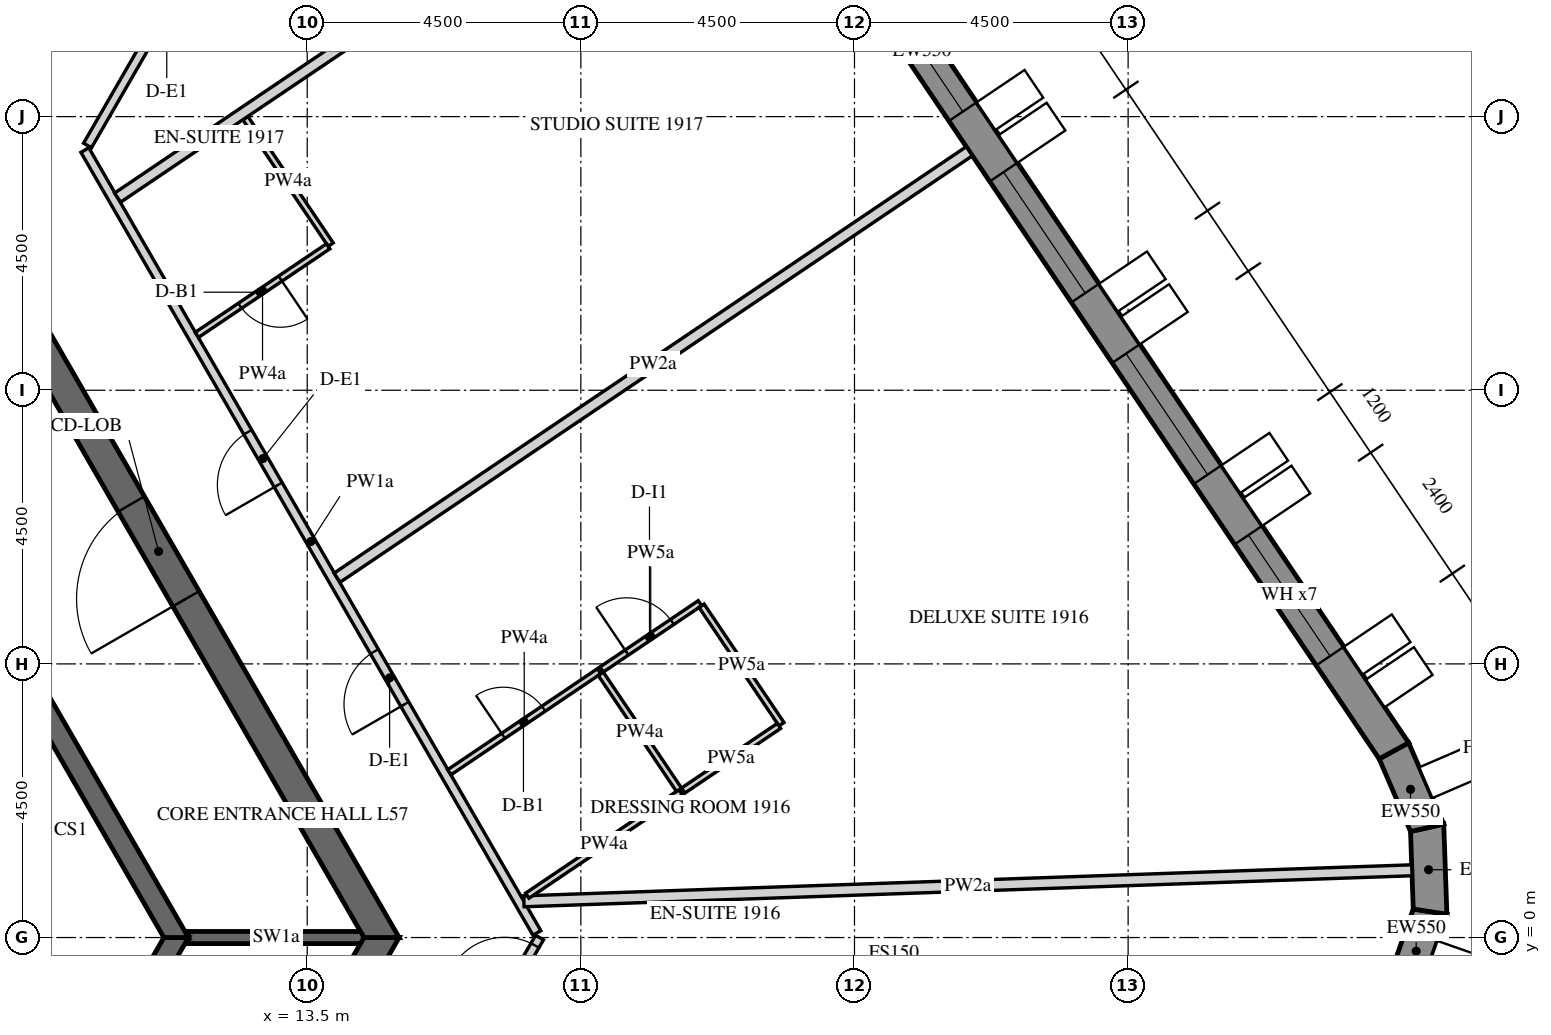
"""IFC4 building model, lengths in metres.
Left out: names, types, materials, properties, quantities, classifications, styles, units other than length and angle.
Written with IfcOpenShell. Run it as: python <this file> out.ifc"""

import sys

from ifc_helpers import new_model, si_unit, direction, frame, frame_2d, origin, place, context, subcontext, project, spatial, polyline, rectangle, outline, extrude, element, fill, save


model = new_model("IFC4")
c1 = context("Model", 3, precision=1e-05, world=origin(), true_north=direction((0.0, 1.0)))
c2 = subcontext(c1, "Body", "Model", "MODEL_VIEW")
j1 = project(units=[si_unit("LENGTHUNIT", "METRE"), si_unit("PLANEANGLEUNIT", "RADIAN")], contexts=[c1])
p1 = place(None, origin())
s1 = spatial("IfcSite", under=j1, at=p1, CompositionType="ELEMENT")
p2 = place(p1, origin())
s2 = spatial("IfcBuilding", under=s1, at=p2, CompositionType="ELEMENT")
p3 = place(p2, frame((0.0, 0.0, 238.5)))
s3 = spatial("IfcBuildingStorey", under=s2, at=p3, CompositionType="ELEMENT", Elevation=238.5)
p4 = place(p3, frame((31.509, -0.875, -0.15), z_axis=(0.0, 0.0, 1.0), x_axis=(0.33111537203, 0.943590276765, 0.0)))
e1 = element("IfcWall", 1, at=p4, inside=s3, PredefinedType="SOLIDWALL", context=c2, shape_type="SweptSolid", body=[
    extrude(outline(polyline([(-0.026, -0.275), (1.431, -0.275), (1.327, 0.275), (0.026, 0.275), (-0.026, -0.275)])), origin(), (0.0, 0.0, 1.0), 3.9),
])
p5 = place(p3, frame((31.966, 0.426, -0.15), z_axis=(0.0, 0.0, 1.0), x_axis=(-0.034876908462, 0.999391615562, 0.0)))
e2 = element("IfcWall", 2, at=p5, inside=s3, PredefinedType="SOLIDWALL", context=c2, shape_type="SweptSolid", body=[
    extrude(outline(polyline([(-0.052, -0.275), (1.431, -0.275), (1.327, 0.275), (0.052, 0.275), (-0.052, -0.275)])), origin(), (0.0, 0.0, 1.0), 3.9),
])
p6 = place(p3, frame((31.917, 1.804, -0.15), z_axis=(0.0, 0.0, 1.0), x_axis=(-0.396225741392, 0.918153125496, 0.0)))
e3 = element("IfcWall", 3, at=p6, inside=s3, PredefinedType="SOLIDWALL", context=c2, shape_type="SweptSolid", body=[
    extrude(outline(polyline([(-0.052, -0.275), (1.405, -0.275), (1.353, 0.275), (0.052, 0.275), (-0.052, -0.275)])), origin(), (0.0, 0.0, 1.0), 3.9),
])
p7 = place(p3, frame((31.371, 3.071, -0.15), z_axis=(0.0, 0.0, 1.0), x_axis=(-0.559189891278, 0.829039604297, 0.0)))
e4 = element("IfcWall", 4, at=p7, inside=s3, PredefinedType="SOLIDWALL", context=c2, shape_type="SweptSolid", body=[
    extrude(outline(polyline([(-0.026, -0.275), (27.781, -0.275), (27.736, 0.275), (0.026, 0.275), (-0.026, -0.275)])), origin(), (0.0, 0.0, 1.0), 3.9),
])
p8 = place(p7, frame((1.879, 0.0, 1.05)))
e5 = element("IfcOpeningElement", 5, at=p8, cuts=e4, PredefinedType="OPENING", context=c2, shape_type="SweptSolid", body=[
    extrude(rectangle(XDim=2.4, YDim=2.4, at=frame_2d((1.2, 1.2))), frame((0.0, 0.285, 0.0), z_axis=(0.0, -1.0, 0.0), x_axis=(1.0, 0.0, 0.0)), (0.0, 0.0, 1.0), 0.57),
])
p9 = place(p7, frame((5.479, 0.0, 1.05)))
e6 = element("IfcOpeningElement", 6, at=p9, cuts=e4, PredefinedType="OPENING", context=c2, shape_type="SweptSolid", body=[
    extrude(rectangle(XDim=2.4, YDim=2.4, at=frame_2d((1.2, 1.2))), frame((0.0, 0.285, 0.0), z_axis=(0.0, -1.0, 0.0), x_axis=(1.0, 0.0, 0.0)), (0.0, 0.0, 1.0), 0.57),
])
p10 = place(p7, frame((9.079, 0.0, 1.05)))
e7 = element("IfcOpeningElement", 7, at=p10, cuts=e4, PredefinedType="OPENING", context=c2, shape_type="SweptSolid", body=[
    extrude(rectangle(XDim=2.4, YDim=2.4, at=frame_2d((1.2, 1.2))), frame((0.0, 0.285, 0.0), z_axis=(0.0, -1.0, 0.0), x_axis=(1.0, 0.0, 0.0)), (0.0, 0.0, 1.0), 0.57),
])
p11 = place(p7, frame((12.679, 0.0, 1.05)))
e8 = element("IfcOpeningElement", 8, at=p11, cuts=e4, PredefinedType="OPENING", context=c2, shape_type="SweptSolid", body=[
    extrude(rectangle(XDim=2.4, YDim=2.4, at=frame_2d((1.2, 1.2))), frame((0.0, 0.285, 0.0), z_axis=(0.0, -1.0, 0.0), x_axis=(1.0, 0.0, 0.0)), (0.0, 0.0, 1.0), 0.57),
])
p12 = place(p7, frame((16.279, 0.0, 1.05)))
e9 = element("IfcOpeningElement", 9, at=p12, cuts=e4, PredefinedType="OPENING", context=c2, shape_type="SweptSolid", body=[
    extrude(rectangle(XDim=2.4, YDim=2.4, at=frame_2d((1.2, 1.2))), frame((0.0, 0.285, 0.0), z_axis=(0.0, -1.0, 0.0), x_axis=(1.0, 0.0, 0.0)), (0.0, 0.0, 1.0), 0.57),
])
p13 = place(p7, frame((19.879, 0.0, 1.05)))
e10 = element("IfcOpeningElement", 10, at=p13, cuts=e4, PredefinedType="OPENING", context=c2, shape_type="SweptSolid", body=[
    extrude(rectangle(XDim=2.4, YDim=2.4, at=frame_2d((1.2, 1.2))), frame((0.0, 0.285, 0.0), z_axis=(0.0, -1.0, 0.0), x_axis=(1.0, 0.0, 0.0)), (0.0, 0.0, 1.0), 0.57),
])
p14 = place(p7, frame((23.479, 0.0, 1.05)))
e11 = element("IfcOpeningElement", 11, at=p14, cuts=e4, PredefinedType="OPENING", context=c2, shape_type="SweptSolid", body=[
    extrude(rectangle(XDim=2.4, YDim=2.4, at=frame_2d((1.2, 1.2))), frame((0.0, 0.285, 0.0), z_axis=(0.0, -1.0, 0.0), x_axis=(1.0, 0.0, 0.0)), (0.0, 0.0, 1.0), 0.57),
])
p15 = place(p3, frame((7.361, -12.75, -0.15), z_axis=(0.0, 0.0, 1.0), x_axis=(0.50000571537, 0.866022103989, 0.0)))
e12 = element("IfcWall", 12, at=p15, inside=s3, PredefinedType="SHEAR", context=c2, shape_type="SweptSolid", body=[
    extrude(outline(polyline([(-0.144, -0.25), (14.867, -0.25), (14.578, 0.25), (0.144, 0.25), (-0.144, -0.25)])), origin(), (0.0, 0.0, 1.0), 3.9),
])
p16 = place(p15, frame((6.49, 0.0, 0.15)))
e13 = element("IfcOpeningElement", 13, at=p16, cuts=e12, PredefinedType="OPENING", context=c2, shape_type="SweptSolid", body=[
    extrude(rectangle(XDim=1.8, YDim=2.4, at=frame_2d((0.9, 1.2))), frame((0.0, 0.26, 0.0), z_axis=(0.0, -1.0, 0.0), x_axis=(1.0, 0.0, 0.0)), (0.0, 0.0, 1.0), 0.52),
])
p17 = place(p3, frame((14.722, 0.0, -0.15), z_axis=(0.0, 0.0, 1.0), x_axis=(-0.50000571537, 0.866022103989, 0.0)))
e14 = element("IfcWall", 14, at=p17, inside=s3, PredefinedType="SHEAR", context=c2, shape_type="SweptSolid", body=[
    extrude(outline(polyline([(-0.144, -0.25), (14.867, -0.25), (14.578, 0.25), (0.144, 0.25), (-0.144, -0.25)])), origin(), (0.0, 0.0, 1.0), 3.9),
])
p18 = place(p17, frame((6.432, 0.0, 0.15)))
e15 = element("IfcOpeningElement", 15, at=p18, cuts=e14, PredefinedType="OPENING", context=c2, shape_type="SweptSolid", body=[
    extrude(rectangle(XDim=1.8, YDim=2.4, at=frame_2d((0.9, 1.2))), frame((0.0, 0.26, 0.0), z_axis=(0.0, -1.0, 0.0), x_axis=(1.0, 0.0, 0.0)), (0.0, 0.0, 1.0), 0.52),
])
p19 = place(p3, frame((7.506, 13.0, -0.15), z_axis=(0.0, 0.0, 1.0), x_axis=(0.499988271576, 0.866032175087, 0.0)))
e16 = element("IfcWall", 16, at=p19, inside=s3, PredefinedType="SHEAR", context=c2, shape_type="SweptSolid", body=[
    extrude(rectangle(XDim=15.424, YDim=0.5, at=frame_2d((7.712, 0.0))), origin(), (0.0, 0.0, 1.0), 3.9),
])
p20 = place(p19, frame((6.812, 0.0, 0.15)))
e17 = element("IfcOpeningElement", 17, at=p20, cuts=e16, PredefinedType="OPENING", context=c2, shape_type="SweptSolid", body=[
    extrude(rectangle(XDim=1.8, YDim=2.4, at=frame_2d((0.9, 1.2))), frame((0.0, 0.26, 0.0), z_axis=(0.0, -1.0, 0.0), x_axis=(1.0, 0.0, 0.0)), (0.0, 0.0, 1.0), 0.52),
])
p21 = place(p3, frame((5.673, -9.825, -0.15), z_axis=(0.0, 0.0, 1.0), x_axis=(0.499995046907, 0.866028263435, 0.0)))
e18 = element("IfcWall", 18, at=p21, inside=s3, PredefinedType="SHEAR", context=c2, shape_type="SweptSolid", body=[
    extrude(outline(polyline([(-0.101, -0.175), (11.446, -0.175), (11.244, 0.175), (0.101, 0.175), (-0.101, -0.175)])), origin(), (0.0, 0.0, 1.0), 3.9),
])
p22 = place(p21, frame((4.801, 0.0, 0.15)))
e19 = element("IfcOpeningElement", 19, at=p22, cuts=e18, PredefinedType="OPENING", context=c2, shape_type="SweptSolid", body=[
    extrude(rectangle(XDim=1.8, YDim=2.4, at=frame_2d((0.9, 1.2))), frame((0.0, 0.185, 0.0), z_axis=(0.0, -1.0, 0.0), x_axis=(1.0, 0.0, 0.0)), (0.0, 0.0, 1.0), 0.37),
])
p23 = place(p3, frame((11.345, 0.0, -0.15), z_axis=(0.0, 0.0, 1.0), x_axis=(-0.499995046907, 0.866028263435, 0.0)))
e20 = element("IfcWall", 20, at=p23, inside=s3, PredefinedType="SHEAR", context=c2, shape_type="SweptSolid", body=[
    extrude(outline(polyline([(-0.101, -0.175), (11.446, -0.175), (11.244, 0.175), (0.101, 0.175), (-0.101, -0.175)])), origin(), (0.0, 0.0, 1.0), 3.9),
])
p24 = place(p23, frame((4.744, 0.0, 0.15)))
e21 = element("IfcOpeningElement", 21, at=p24, cuts=e20, PredefinedType="OPENING", context=c2, shape_type="SweptSolid", body=[
    extrude(rectangle(XDim=1.8, YDim=2.4, at=frame_2d((0.9, 1.2))), frame((0.0, 0.185, 0.0), z_axis=(0.0, -1.0, 0.0), x_axis=(1.0, 0.0, 0.0)), (0.0, 0.0, 1.0), 0.37),
])
p25 = place(p3, frame((11.547, 0.0, -0.15), z_axis=(0.0, 0.0, 1.0), x_axis=(1.0, 0.0, 0.0)))
e22 = element("IfcWall", 22, at=p25, inside=s3, PredefinedType="SHEAR", context=c2, shape_type="SweptSolid", body=[
    extrude(rectangle(XDim=2.887, YDim=0.2, at=frame_2d((1.443, 0.0))), origin(), (0.0, 0.0, 1.0), 3.9),
])
p26 = place(p3, frame((9.887, -12.875, 0.0), z_axis=(0.0, 0.0, 1.0), x_axis=(0.499998228944, 0.866026426302, 0.0)))
e23 = element("IfcWall", 23, at=p26, inside=s3, PredefinedType="PARTITIONING", context=c2, shape_type="SweptSolid", body=[
    extrude(rectangle(XDim=14.867, YDim=0.15, at=frame_2d((7.433, 0.0))), origin(), (0.0, 0.0, 1.0), 2.838),
])
p27 = place(p26, frame((3.519, 0.0, 0.0)))
e24 = element("IfcOpeningElement", 24, at=p27, cuts=e23, PredefinedType="OPENING", context=c2, shape_type="SweptSolid", body=[
    extrude(rectangle(XDim=1.0, YDim=2.1, at=frame_2d((0.5, 1.05))), frame((0.0, 0.085, 0.0), z_axis=(0.0, -1.0, 0.0), x_axis=(1.0, 0.0, 0.0)), (0.0, 0.0, 1.0), 0.17),
])
p28 = place(p26, frame((7.324, 0.0, 0.0)))
e25 = element("IfcOpeningElement", 25, at=p28, cuts=e23, PredefinedType="OPENING", context=c2, shape_type="SweptSolid", body=[
    extrude(rectangle(XDim=1.0, YDim=2.1, at=frame_2d((0.5, 1.05))), frame((0.0, 0.085, 0.0), z_axis=(0.0, -1.0, 0.0), x_axis=(1.0, 0.0, 0.0)), (0.0, 0.0, 1.0), 0.17),
])
p29 = place(p26, frame((13.717, 0.0, 0.0)))
e26 = element("IfcOpeningElement", 26, at=p29, cuts=e23, PredefinedType="OPENING", context=c2, shape_type="SweptSolid", body=[
    extrude(rectangle(XDim=1.0, YDim=2.1, at=frame_2d((0.5, 1.05))), frame((0.0, 0.085, 0.0), z_axis=(0.0, -1.0, 0.0), x_axis=(1.0, 0.0, 0.0)), (0.0, 0.0, 1.0), 0.17),
])
p30 = place(p3, frame((17.277, 0.075, 0.0), z_axis=(0.0, 0.0, 1.0), x_axis=(-0.499998228944, 0.866026426302, 0.0)))
e27 = element("IfcWall", 27, at=p30, inside=s3, PredefinedType="PARTITIONING", context=c2, shape_type="SweptSolid", body=[
    extrude(rectangle(XDim=14.867, YDim=0.15, at=frame_2d((7.433, 0.0))), origin(), (0.0, 0.0, 1.0), 2.838),
])
p31 = place(p30, frame((4.345, 0.0, 0.0)))
e28 = element("IfcOpeningElement", 28, at=p31, cuts=e27, PredefinedType="OPENING", context=c2, shape_type="SweptSolid", body=[
    extrude(rectangle(XDim=1.0, YDim=2.1, at=frame_2d((0.5, 1.05))), frame((0.0, 0.085, 0.0), z_axis=(0.0, -1.0, 0.0), x_axis=(1.0, 0.0, 0.0)), (0.0, 0.0, 1.0), 0.17),
])
p32 = place(p30, frame((8.51, 0.0, 0.0)))
e29 = element("IfcOpeningElement", 29, at=p32, cuts=e27, PredefinedType="OPENING", context=c2, shape_type="SweptSolid", body=[
    extrude(rectangle(XDim=1.0, YDim=2.1, at=frame_2d((0.5, 1.05))), frame((0.0, 0.085, 0.0), z_axis=(0.0, -1.0, 0.0), x_axis=(1.0, 0.0, 0.0)), (0.0, 0.0, 1.0), 0.17),
])
p33 = place(p3, frame((9.887, 13.025, 0.0), z_axis=(0.0, 0.0, 1.0), x_axis=(0.499985955615, 0.866033512162, 0.0)))
e30 = element("IfcWall", 30, at=p33, inside=s3, PredefinedType="PARTITIONING", context=c2, shape_type="SweptSolid", body=[
    extrude(rectangle(XDim=7.699, YDim=0.15, at=frame_2d((3.85, 0.0))), origin(), (0.0, 0.0, 1.0), 2.838),
])
p34 = place(p33, frame((2.106, 0.0, 0.0)))
e31 = element("IfcOpeningElement", 31, at=p34, cuts=e30, PredefinedType="OPENING", context=c2, shape_type="SweptSolid", body=[
    extrude(rectangle(XDim=1.0, YDim=2.1, at=frame_2d((0.5, 1.05))), frame((0.0, 0.085, 0.0), z_axis=(0.0, -1.0, 0.0), x_axis=(1.0, 0.0, 0.0)), (0.0, 0.0, 1.0), 0.17),
])
p35 = place(p3, frame((31.667, 1.106, 0.0), z_axis=(0.0, 0.0, 1.0), x_axis=(-0.999391305206, -0.034885800543, 0.0)))
e32 = element("IfcWall", 32, at=p35, inside=s3, PredefinedType="PARTITIONING", context=c2, shape_type="SweptSolid", body=[
    extrude(rectangle(XDim=14.612, YDim=0.18, at=frame_2d((7.306, 0.0))), origin(), (0.0, 0.0, 1.0), 2.838),
])
p36 = place(p3, frame((15.838, 2.719, 0.0), z_axis=(0.0, 0.0, 1.0), x_axis=(0.829027811096, 0.559207375156, 0.0)))
e33 = element("IfcWall", 33, at=p36, inside=s3, PredefinedType="PARTITIONING", context=c2, shape_type="SweptSolid", body=[
    extrude(rectangle(XDim=2.97, YDim=0.1, at=frame_2d((1.485, 0.0))), origin(), (0.0, 0.0, 1.0), 2.838),
])
p37 = place(p36, frame((1.07, 0.0, 0.0)))
e34 = element("IfcOpeningElement", 34, at=p37, cuts=e33, PredefinedType="OPENING", context=c2, shape_type="SweptSolid", body=[
    extrude(rectangle(XDim=0.8, YDim=2.1, at=frame_2d((0.4, 1.05))), frame((0.0, 0.06, 0.0), z_axis=(0.0, -1.0, 0.0), x_axis=(1.0, 0.0, 0.0)), (0.0, 0.0, 1.0), 0.12),
])
p38 = place(p3, frame((19.642, 2.389, 0.0), z_axis=(0.0, 0.0, 1.0), x_axis=(-0.82902628405, -0.559209639004, 0.0)))
e35 = element("IfcWall", 35, at=p38, inside=s3, PredefinedType="PARTITIONING", context=c2, shape_type="SweptSolid", body=[
    extrude(rectangle(XDim=3.043, YDim=0.1, at=frame_2d((1.521, 0.0))), origin(), (0.0, 0.0, 1.0), 2.838),
])
p39 = place(p3, frame((18.341, 4.407, 0.0), z_axis=(0.0, 0.0, 1.0), x_axis=(0.829014089772, 0.559227716552, 0.0)))
e36 = element("IfcWall", 36, at=p39, inside=s3, PredefinedType="PARTITIONING", context=c2, shape_type="SweptSolid", body=[
    extrude(rectangle(XDim=1.95, YDim=0.1, at=frame_2d((0.975, 0.0))), origin(), (0.0, 0.0, 1.0), 2.838),
])
p40 = place(p39, frame((0.5, 0.0, 0.0)))
e37 = element("IfcOpeningElement", 37, at=p40, cuts=e36, PredefinedType="OPENING", context=c2, shape_type="SweptSolid", body=[
    extrude(rectangle(XDim=0.9, YDim=2.1, at=frame_2d((0.45, 1.05))), frame((0.0, 0.06, 0.0), z_axis=(0.0, -1.0, 0.0), x_axis=(1.0, 0.0, 0.0)), (0.0, 0.0, 1.0), 0.12),
])
p41 = place(p3, frame((19.986, 5.456, 0.0), z_axis=(0.0, 0.0, 1.0), x_axis=(0.559223037199, -0.829017246302, 0.0)))
e38 = element("IfcWall", 38, at=p41, inside=s3, PredefinedType="PARTITIONING", context=c2, shape_type="SweptSolid", body=[
    extrude(rectangle(XDim=2.35, YDim=0.1, at=frame_2d((1.175, 0.0))), origin(), (0.0, 0.0, 1.0), 2.838),
])
p42 = place(p3, frame((21.258, 3.48, 0.0), z_axis=(0.0, 0.0, 1.0), x_axis=(-0.82903334026, -0.559199178055, 0.0)))
e39 = element("IfcWall", 39, at=p42, inside=s3, PredefinedType="PARTITIONING", context=c2, shape_type="SweptSolid", body=[
    extrude(rectangle(XDim=1.9, YDim=0.1, at=frame_2d((0.95, 0.0))), origin(), (0.0, 0.0, 1.0), 2.838),
])
p43 = place(p3, frame((24.389, 12.931, 0.0), z_axis=(0.0, 0.0, 1.0), x_axis=(-0.829040439793, -0.559188652593, 0.0)))
e40 = element("IfcWall", 40, at=p43, inside=s3, PredefinedType="PARTITIONING", context=c2, shape_type="SweptSolid", body=[
    extrude(rectangle(XDim=12.542, YDim=0.18, at=frame_2d((6.271, 0.0))), origin(), (0.0, 0.0, 1.0), 2.838),
])
p44 = place(p3, frame((19.614, 2.431, 0.0), z_axis=(0.0, 0.0, 1.0), x_axis=(-0.559199358977, 0.829033218225, 0.0)))
e41 = element("IfcWall", 41, at=p44, inside=s3, PredefinedType="PARTITIONING", context=c2, shape_type="SweptSolid", body=[
    extrude(rectangle(XDim=2.3, YDim=0.1, at=frame_2d((1.15, 0.0))), origin(), (0.0, 0.0, 1.0), 2.838),
])
p45 = place(p3, frame((12.483, 13.476, 0.0), z_axis=(0.0, 0.0, 1.0), x_axis=(0.559203861497, -0.829030181168, 0.0)))
e42 = element("IfcWall", 42, at=p45, inside=s3, PredefinedType="PARTITIONING", context=c2, shape_type="SweptSolid", body=[
    extrude(rectangle(XDim=2.51, YDim=0.1, at=frame_2d((1.255, 0.0))), origin(), (0.0, 0.0, 1.0), 2.838),
])
p46 = place(p3, frame((13.845, 11.367, 0.0), z_axis=(0.0, 0.0, 1.0), x_axis=(-0.829068087245, -0.55914766092, 0.0)))
e43 = element("IfcWall", 43, at=p46, inside=s3, PredefinedType="PARTITIONING", context=c2, shape_type="SweptSolid", body=[
    extrude(rectangle(XDim=2.605, YDim=0.1, at=frame_2d((1.302, 0.0))), origin(), (0.0, 0.0, 1.0), 2.838),
])
p47 = place(p46, frame((0.95, 0.0, 0.0)))
e44 = element("IfcOpeningElement", 44, at=p47, cuts=e43, PredefinedType="OPENING", context=c2, shape_type="SweptSolid", body=[
    extrude(rectangle(XDim=0.8, YDim=2.1, at=frame_2d((0.4, 1.05))), frame((0.0, 0.06, 0.0), z_axis=(0.0, -1.0, 0.0), x_axis=(1.0, 0.0, 0.0)), (0.0, 0.0, 1.0), 0.12),
])
p48 = place(p3, frame((20.363, 18.9, 0.0), z_axis=(0.0, 0.0, 1.0), x_axis=(-0.829027307641, -0.559208121531, 0.0)))
e45 = element("IfcWall", 45, at=p48, inside=s3, PredefinedType="PARTITIONING", context=c2, shape_type="SweptSolid", body=[
    extrude(rectangle(XDim=12.039, YDim=0.18, at=frame_2d((6.02, 0.0))), origin(), (0.0, 0.0, 1.0), 2.838),
])
p49 = place(p8, frame((0.0, 0.205, 0.0)))
e46 = element("IfcWindow", 46, at=p49, inside=s3, PartitioningType="DOUBLE_PANEL_VERTICAL", PredefinedType="WINDOW", context=c2, shape_type="SweptSolid", body=[
    extrude(rectangle(XDim=2.4, YDim=2.4, at=frame_2d((1.2, 1.2))), frame((0.0, 0.03, 0.0), z_axis=(0.0, -1.0, 0.0), x_axis=(1.0, 0.0, 0.0)), (0.0, 0.0, 1.0), 0.06),
])
fill(e5, e46)
p50 = place(p9, frame((0.0, 0.205, 0.0)))
e47 = element("IfcWindow", 47, at=p50, inside=s3, PartitioningType="DOUBLE_PANEL_VERTICAL", PredefinedType="WINDOW", context=c2, shape_type="SweptSolid", body=[
    extrude(rectangle(XDim=2.4, YDim=2.4, at=frame_2d((1.2, 1.2))), frame((0.0, 0.03, 0.0), z_axis=(0.0, -1.0, 0.0), x_axis=(1.0, 0.0, 0.0)), (0.0, 0.0, 1.0), 0.06),
])
fill(e6, e47)
p51 = place(p10, frame((0.0, 0.205, 0.0)))
e48 = element("IfcWindow", 48, at=p51, inside=s3, PartitioningType="DOUBLE_PANEL_VERTICAL", PredefinedType="WINDOW", context=c2, shape_type="SweptSolid", body=[
    extrude(rectangle(XDim=2.4, YDim=2.4, at=frame_2d((1.2, 1.2))), frame((0.0, 0.03, 0.0), z_axis=(0.0, -1.0, 0.0), x_axis=(1.0, 0.0, 0.0)), (0.0, 0.0, 1.0), 0.06),
])
fill(e7, e48)
p52 = place(p11, frame((0.0, 0.205, 0.0)))
e49 = element("IfcWindow", 49, at=p52, inside=s3, PartitioningType="DOUBLE_PANEL_VERTICAL", PredefinedType="WINDOW", context=c2, shape_type="SweptSolid", body=[
    extrude(rectangle(XDim=2.4, YDim=2.4, at=frame_2d((1.2, 1.2))), frame((0.0, 0.03, 0.0), z_axis=(0.0, -1.0, 0.0), x_axis=(1.0, 0.0, 0.0)), (0.0, 0.0, 1.0), 0.06),
])
fill(e8, e49)
p53 = place(p18, origin())
e50 = element("IfcDoor", 50, at=p53, inside=s3, OperationType="DOUBLE_DOOR_SINGLE_SWING", PredefinedType="DOOR", context=c2, shape_type="SweptSolid", body=[
    extrude(rectangle(XDim=1.8, YDim=2.4, at=frame_2d((0.9, 1.2))), frame((0.0, 0.025, 0.0), z_axis=(0.0, -1.0, 0.0), x_axis=(1.0, 0.0, 0.0)), (0.0, 0.0, 1.0), 0.05),
])
fill(e15, e50)
p54 = place(p29, origin())
e51 = element("IfcDoor", 51, at=p54, inside=s3, OperationType="SINGLE_SWING_LEFT", PredefinedType="DOOR", context=c2, shape_type="SweptSolid", body=[
    extrude(rectangle(XDim=1.0, YDim=2.1, at=frame_2d((0.5, 1.05))), frame((0.0, 0.025, 0.0), z_axis=(0.0, -1.0, 0.0), x_axis=(1.0, 0.0, 0.0)), (0.0, 0.0, 1.0), 0.05),
])
fill(e26, e51)
p55 = place(p31, origin())
e52 = element("IfcDoor", 52, at=p55, inside=s3, OperationType="SINGLE_SWING_LEFT", PredefinedType="DOOR", context=c2, shape_type="SweptSolid", body=[
    extrude(rectangle(XDim=1.0, YDim=2.1, at=frame_2d((0.5, 1.05))), frame((0.0, 0.025, 0.0), z_axis=(0.0, -1.0, 0.0), x_axis=(1.0, 0.0, 0.0)), (0.0, 0.0, 1.0), 0.05),
])
fill(e28, e52)
p56 = place(p37, origin())
e53 = element("IfcDoor", 53, at=p56, inside=s3, OperationType="SINGLE_SWING_RIGHT", PredefinedType="DOOR", context=c2, shape_type="SweptSolid", body=[
    extrude(rectangle(XDim=0.8, YDim=2.1, at=frame_2d((0.4, 1.05))), frame((0.0, 0.025, 0.0), z_axis=(0.0, -1.0, 0.0), x_axis=(1.0, 0.0, 0.0)), (0.0, 0.0, 1.0), 0.05),
])
fill(e34, e53)
p57 = place(p40, origin())
e54 = element("IfcDoor", 54, at=p57, inside=s3, OperationType="SINGLE_SWING_RIGHT", PredefinedType="DOOR", context=c2, shape_type="SweptSolid", body=[
    extrude(rectangle(XDim=0.9, YDim=2.1, at=frame_2d((0.45, 1.05))), frame((0.0, 0.025, 0.0), z_axis=(0.0, -1.0, 0.0), x_axis=(1.0, 0.0, 0.0)), (0.0, 0.0, 1.0), 0.05),
])
fill(e37, e54)
p58 = place(p32, origin())
e55 = element("IfcDoor", 55, at=p58, inside=s3, OperationType="SINGLE_SWING_RIGHT", PredefinedType="DOOR", context=c2, shape_type="SweptSolid", body=[
    extrude(rectangle(XDim=1.0, YDim=2.1, at=frame_2d((0.5, 1.05))), frame((0.0, 0.025, 0.0), z_axis=(0.0, -1.0, 0.0), x_axis=(1.0, 0.0, 0.0)), (0.0, 0.0, 1.0), 0.05),
])
fill(e29, e55)
p59 = place(p47, origin())
e56 = element("IfcDoor", 56, at=p59, inside=s3, OperationType="SINGLE_SWING_LEFT", PredefinedType="DOOR", context=c2, shape_type="SweptSolid", body=[
    extrude(rectangle(XDim=0.8, YDim=2.1, at=frame_2d((0.4, 1.05))), frame((0.0, 0.025, 0.0), z_axis=(0.0, -1.0, 0.0), x_axis=(1.0, 0.0, 0.0)), (0.0, 0.0, 1.0), 0.05),
])
fill(e44, e56)
save(model, sys.argv[1])
